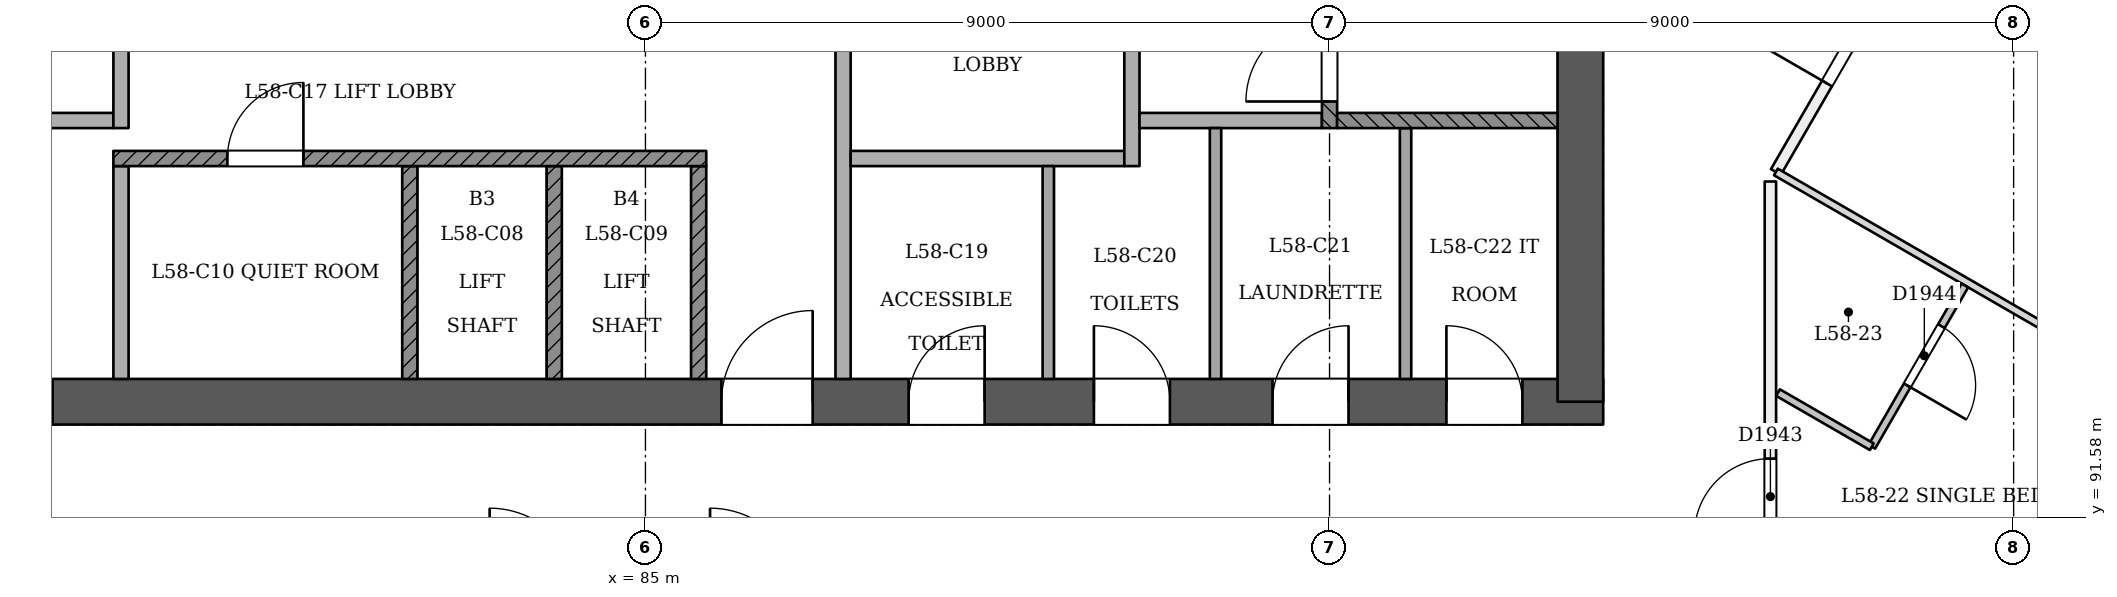
"""IFC4 building model, lengths in metres.
Left out: names, types, materials, properties, quantities, classifications, styles, units other than length and angle.
Written with IfcOpenShell. Run it as: python <this file> out.ifc"""

import sys

from ifc_helpers import new_model, si_unit, direction, frame, frame_2d, origin, place, context, subcontext, project, spatial, rectangle, extrude, element, fill, save


model = new_model("IFC4")
c1 = context("Model", 3, precision=1e-05, world=origin(), true_north=direction((0.0, 1.0)))
c2 = subcontext(c1, "Body", "Model", "MODEL_VIEW")
j1 = project(units=[si_unit("LENGTHUNIT", "METRE"), si_unit("PLANEANGLEUNIT", "RADIAN")], contexts=[c1])
p1 = place(None, origin())
s1 = spatial("IfcSite", under=j1, at=p1, CompositionType="ELEMENT")
p2 = place(p1, origin())
s2 = spatial("IfcBuilding", under=s1, at=p2, CompositionType="ELEMENT")
p3 = place(p2, frame((0.0, 0.0, 226.6)))
s3 = spatial("IfcBuildingStorey", under=s2, at=p3, CompositionType="ELEMENT", Elevation=226.6)
p4 = place(p3, frame((72.7, 93.1, 0.0), z_axis=(0.0, 0.0, 1.0), x_axis=(1.0, 0.0, 0.0)))
e1 = element("IfcWall", 1, at=p4, inside=s3, PredefinedType="SHEAR", context=c2, shape_type="SweptSolid", body=[
    extrude(rectangle(XDim=24.9, YDim=0.6, at=frame_2d((12.45, 0.0))), origin(), (0.0, 0.0, 1.0), 3.6),
])
p5 = place(p4, frame((1.1, 0.0, 0.0)))
e2 = element("IfcOpeningElement", 2, at=p5, cuts=e1, PredefinedType="OPENING", context=c2, shape_type="SweptSolid", body=[
    extrude(rectangle(XDim=1.2, YDim=2.1, at=frame_2d((0.6, 1.05))), frame((0.0, 0.311, 0.0), z_axis=(0.0, -1.0, 0.0), x_axis=(1.0, 0.0, 0.0)), (0.0, 0.0, 1.0), 0.621),
])
p6 = place(p4, frame((3.3, 0.0, 0.0)))
e3 = element("IfcOpeningElement", 3, at=p6, cuts=e1, PredefinedType="OPENING", context=c2, shape_type="SweptSolid", body=[
    extrude(rectangle(XDim=1.2, YDim=2.1, at=frame_2d((0.6, 1.05))), frame((0.0, 0.311, 0.0), z_axis=(0.0, -1.0, 0.0), x_axis=(1.0, 0.0, 0.0)), (0.0, 0.0, 1.0), 0.621),
])
p7 = place(p4, frame((13.3, 0.0, 0.0)))
e4 = element("IfcOpeningElement", 4, at=p7, cuts=e1, PredefinedType="OPENING", context=c2, shape_type="SweptSolid", body=[
    extrude(rectangle(XDim=1.2, YDim=2.1, at=frame_2d((0.6, 1.05))), frame((0.0, 0.311, 0.0), z_axis=(0.0, -1.0, 0.0), x_axis=(1.0, 0.0, 0.0)), (0.0, 0.0, 1.0), 0.621),
])
p8 = place(p4, frame((15.762, 0.0, 0.0)))
e5 = element("IfcOpeningElement", 5, at=p8, cuts=e1, PredefinedType="OPENING", context=c2, shape_type="SweptSolid", body=[
    extrude(rectangle(XDim=1.0, YDim=2.1, at=frame_2d((0.5, 1.05))), frame((0.0, 0.311, 0.0), z_axis=(0.0, -1.0, 0.0), x_axis=(1.0, 0.0, 0.0)), (0.0, 0.0, 1.0), 0.621),
])
p9 = place(p4, frame((18.2, 0.0, 0.0)))
e6 = element("IfcOpeningElement", 6, at=p9, cuts=e1, PredefinedType="OPENING", context=c2, shape_type="SweptSolid", body=[
    extrude(rectangle(XDim=1.0, YDim=2.1, at=frame_2d((0.5, 1.05))), frame((0.0, 0.311, 0.0), z_axis=(0.0, -1.0, 0.0), x_axis=(1.0, 0.0, 0.0)), (0.0, 0.0, 1.0), 0.621),
])
p10 = place(p4, frame((20.55, 0.0, 0.0)))
e7 = element("IfcOpeningElement", 7, at=p10, cuts=e1, PredefinedType="OPENING", context=c2, shape_type="SweptSolid", body=[
    extrude(rectangle(XDim=1.0, YDim=2.1, at=frame_2d((0.5, 1.05))), frame((0.0, 0.311, 0.0), z_axis=(0.0, -1.0, 0.0), x_axis=(1.0, 0.0, 0.0)), (0.0, 0.0, 1.0), 0.621),
])
p11 = place(p4, frame((22.837, 0.0, 0.0)))
e8 = element("IfcOpeningElement", 8, at=p11, cuts=e1, PredefinedType="OPENING", context=c2, shape_type="SweptSolid", body=[
    extrude(rectangle(XDim=1.0, YDim=2.1, at=frame_2d((0.5, 1.05))), frame((0.0, 0.311, 0.0), z_axis=(0.0, -1.0, 0.0), x_axis=(1.0, 0.0, 0.0)), (0.0, 0.0, 1.0), 0.621),
])
p12 = place(p3, frame((97.3, 93.1, 0.0), z_axis=(0.0, 0.0, 1.0), x_axis=(0.0, 1.0, 0.0)))
e9 = element("IfcWall", 9, at=p12, inside=s3, PredefinedType="SHEAR", context=c2, shape_type="SweptSolid", body=[
    extrude(rectangle(XDim=10.9, YDim=0.6, at=frame_2d((5.45, 0.0))), origin(), (0.0, 0.0, 1.0), 3.6),
])
p13 = place(p3, frame((99.8, 90.2, 0.0), z_axis=(0.0, 0.0, 1.0), x_axis=(0.0, 1.0, 0.0)))
e10 = element("IfcWall", 10, at=p13, inside=s3, PredefinedType="PARTITIONING", context=c2, shape_type="SweptSolid", body=[
    extrude(rectangle(XDim=5.798, YDim=0.15, at=frame_2d((2.899, 0.0))), origin(), (0.0, 0.0, 1.0), 3.2),
])
p14 = place(p13, frame((1.152, 0.0, 0.0)))
e11 = element("IfcOpeningElement", 11, at=p14, cuts=e10, PredefinedType="OPENING", context=c2, shape_type="SweptSolid", body=[
    extrude(rectangle(XDim=1.0, YDim=2.1, at=frame_2d((0.5, 1.05))), frame((0.0, 0.085, 0.0), z_axis=(0.0, -1.0, 0.0), x_axis=(1.0, 0.0, 0.0)), (0.0, 0.0, 1.0), 0.171),
])
p15 = place(p3, frame((99.872, 96.123, 0.0), z_axis=(0.0, 0.0, 1.0), x_axis=(0.500061224174, 0.865990053105, 0.0)))
e12 = element("IfcWall", 12, at=p15, inside=s3, PredefinedType="PARTITIONING", context=c2, shape_type="SweptSolid", body=[
    extrude(rectangle(XDim=2.745, YDim=0.15, at=frame_2d((1.373, 0.0))), origin(), (0.0, 0.0, 1.0), 3.2),
])
p16 = place(p15, frame((1.345, 0.0, 0.0)))
e13 = element("IfcOpeningElement", 13, at=p16, cuts=e12, PredefinedType="OPENING", context=c2, shape_type="SweptSolid", body=[
    extrude(rectangle(XDim=1.2, YDim=2.1, at=frame_2d((0.6, 1.05))), frame((0.0, 0.085, 0.0), z_axis=(0.0, -1.0, 0.0), x_axis=(1.0, 0.0, 0.0)), (0.0, 0.0, 1.0), 0.171),
])
p17 = place(p3, frame((102.359, 94.63, 0.0), z_axis=(0.0, 0.0, 1.0), x_axis=(-0.500018594424, -0.866014668023, 0.0)))
e14 = element("IfcWall", 14, at=p17, inside=s3, PredefinedType="PARTITIONING", context=c2, shape_type="SweptSolid", body=[
    extrude(rectangle(XDim=2.45, YDim=0.1, at=frame_2d((1.225, 0.0))), origin(), (0.0, 0.0, 1.0), 3.2),
])
p18 = place(p17, frame((0.618, 0.0, 0.0)))
e15 = element("IfcOpeningElement", 15, at=p18, cuts=e14, PredefinedType="OPENING", context=c2, shape_type="SweptSolid", body=[
    extrude(rectangle(XDim=0.9, YDim=2.1, at=frame_2d((0.45, 1.05))), frame((0.0, 0.061, 0.0), z_axis=(0.0, -1.0, 0.0), x_axis=(1.0, 0.0, 0.0)), (0.0, 0.0, 1.0), 0.121),
])
p19 = place(p3, frame((101.134, 92.508, 0.0), z_axis=(0.0, 0.0, 1.0), x_axis=(-0.866020080793, 0.500009219579, 0.0)))
e16 = element("IfcWall", 16, at=p19, inside=s3, PredefinedType="PARTITIONING", context=c2, shape_type="SweptSolid", body=[
    extrude(rectangle(XDim=1.425, YDim=0.1, at=frame_2d((0.712, 0.0))), origin(), (0.0, 0.0, 1.0), 3.2),
])
p20 = place(p3, frame((105.415, 92.923, 0.0), z_axis=(0.0, 0.0, 1.0), x_axis=(-0.866018518567, 0.500011925357, 0.0)))
e17 = element("IfcWall", 17, at=p20, inside=s3, PredefinedType="PARTITIONING", context=c2, shape_type="SweptSolid", body=[
    extrude(rectangle(XDim=6.4, YDim=0.1, at=frame_2d((3.2, 0.0))), origin(), (0.0, 0.0, 1.0), 2.7),
])
p21 = place(p3, frame((78.1, 93.4, 0.0), z_axis=(0.0, 0.0, 1.0), x_axis=(0.0, 1.0, 0.0)))
e18 = element("IfcWall", 18, at=p21, inside=s3, PredefinedType="PARTITIONING", context=c2, shape_type="SweptSolid", body=[
    extrude(rectangle(XDim=2.8, YDim=0.2, at=frame_2d((1.4, 0.0))), origin(), (0.0, 0.0, 1.0), 3.2),
])
for number, where, z_axis, x_axis in (
    (19, (81.9, 93.4, 0.0), (0.0, 0.0, 1.0), (0.0, 1.0, 0.0)),
    (20, (83.8, 93.4, 0.0), (0.0, 0.0, 1.0), (0.0, 1.0, 0.0)),
    (21, (85.7, 93.4, 0.0), (0.0, 0.0, 1.0), (0.0, 1.0, 0.0)),
):
    element("IfcWall", number, at=place(p3, frame(where, z_axis=z_axis, x_axis=x_axis)), inside=s3, PredefinedType="SOLIDWALL", context=c2, shape_type="SweptSolid", body=[
        extrude(rectangle(XDim=2.8, YDim=0.2, at=frame_2d((1.4, 0.0))), origin(), (0.0, 0.0, 1.0), 3.2),
    ])
p22 = place(p3, frame((87.6, 93.4, 0.0), z_axis=(0.0, 0.0, 1.0), x_axis=(0.0, 1.0, 0.0)))
e22 = element("IfcWall", 22, at=p22, inside=s3, PredefinedType="PARTITIONING", context=c2, shape_type="SweptSolid", body=[
    extrude(rectangle(XDim=7.0, YDim=0.2, at=frame_2d((3.5, 0.0))), origin(), (0.0, 0.0, 1.0), 3.2),
])
p23 = place(p22, frame((4.45, 0.0, 0.0)))
e23 = element("IfcOpeningElement", 23, at=p23, cuts=e22, PredefinedType="OPENING", context=c2, shape_type="SweptSolid", body=[
    extrude(rectangle(XDim=1.1, YDim=2.1, at=frame_2d((0.55, 1.05))), frame((0.0, 0.11, 0.0), z_axis=(0.0, -1.0, 0.0), x_axis=(1.0, 0.0, 0.0)), (0.0, 0.0, 1.0), 0.221),
])
p24 = place(p3, frame((90.3, 93.4, 0.0), z_axis=(0.0, 0.0, 1.0), x_axis=(0.0, 1.0, 0.0)))
e24 = element("IfcWall", 24, at=p24, inside=s3, PredefinedType="PARTITIONING", context=c2, shape_type="SweptSolid", body=[
    extrude(rectangle(XDim=2.8, YDim=0.15, at=frame_2d((1.4, 0.0))), origin(), (0.0, 0.0, 1.0), 3.2),
])
for number, where, z_axis, x_axis in (
    (25, (92.5, 93.4, 0.0), (0.0, 0.0, 1.0), (0.0, 1.0, 0.0)),
    (26, (95.0, 93.4, 0.0), (0.0, 0.0, 1.0), (0.0, 1.0, 0.0)),
):
    element("IfcWall", number, at=place(p3, frame(where, z_axis=z_axis, x_axis=x_axis)), inside=s3, PredefinedType="PARTITIONING", context=c2, shape_type="SweptSolid", body=[
        extrude(rectangle(XDim=3.3, YDim=0.15, at=frame_2d((1.65, 0.0))), origin(), (0.0, 0.0, 1.0), 3.2),
    ])
p25 = place(p3, frame((78.0, 96.3, 0.0), z_axis=(0.0, 0.0, 1.0), x_axis=(1.0, 0.0, 0.0)))
e27 = element("IfcWall", 27, at=p25, inside=s3, PredefinedType="SOLIDWALL", context=c2, shape_type="SweptSolid", body=[
    extrude(rectangle(XDim=7.8, YDim=0.2, at=frame_2d((3.9, 0.0))), origin(), (0.0, 0.0, 1.0), 3.2),
])
p26 = place(p25, frame((1.5, 0.0, 0.0)))
e28 = element("IfcOpeningElement", 28, at=p26, cuts=e27, PredefinedType="OPENING", context=c2, shape_type="SweptSolid", body=[
    extrude(rectangle(XDim=1.0, YDim=2.1, at=frame_2d((0.5, 1.05))), frame((0.0, 0.11, 0.0), z_axis=(0.0, -1.0, 0.0), x_axis=(1.0, 0.0, 0.0)), (0.0, 0.0, 1.0), 0.221),
])
p27 = place(p3, frame((87.7, 96.3, 0.0), z_axis=(0.0, 0.0, 1.0), x_axis=(1.0, 0.0, 0.0)))
e29 = element("IfcWall", 29, at=p27, inside=s3, PredefinedType="PARTITIONING", context=c2, shape_type="SweptSolid", body=[
    extrude(rectangle(XDim=3.6, YDim=0.2, at=frame_2d((1.8, 0.0))), origin(), (0.0, 0.0, 1.0), 3.2),
])
p28 = place(p3, frame((91.4, 96.2, 0.0), z_axis=(0.0, 0.0, 1.0), x_axis=(0.0, 1.0, 0.0)))
e30 = element("IfcWall", 30, at=p28, inside=s3, PredefinedType="PARTITIONING", context=c2, shape_type="SweptSolid", body=[
    extrude(rectangle(XDim=4.2, YDim=0.2, at=frame_2d((2.1, 0.0))), origin(), (0.0, 0.0, 1.0), 3.2),
])
p29 = place(p28, frame((2.45, 0.0, 0.0)))
e31 = element("IfcOpeningElement", 31, at=p29, cuts=e30, PredefinedType="OPENING", context=c2, shape_type="SweptSolid", body=[
    extrude(rectangle(XDim=1.1, YDim=2.1, at=frame_2d((0.55, 1.05))), frame((0.0, 0.11, 0.0), z_axis=(0.0, -1.0, 0.0), x_axis=(1.0, 0.0, 0.0)), (0.0, 0.0, 1.0), 0.221),
])
p30 = place(p3, frame((76.1, 96.8, 0.0), z_axis=(0.0, 0.0, 1.0), x_axis=(1.0, 0.0, 0.0)))
e32 = element("IfcWall", 32, at=p30, inside=s3, PredefinedType="PARTITIONING", context=c2, shape_type="SweptSolid", body=[
    extrude(rectangle(XDim=1.9, YDim=0.2, at=frame_2d((0.95, 0.0))), origin(), (0.0, 0.0, 1.0), 3.2),
])
p31 = place(p3, frame((78.1, 96.7, 0.0), z_axis=(0.0, 0.0, 1.0), x_axis=(0.0, 1.0, 0.0)))
e33 = element("IfcWall", 33, at=p31, inside=s3, PredefinedType="PARTITIONING", context=c2, shape_type="SweptSolid", body=[
    extrude(rectangle(XDim=3.7, YDim=0.2, at=frame_2d((1.85, 0.0))), origin(), (0.0, 0.0, 1.0), 3.2),
])
p32 = place(p31, frame((1.95, 0.0, 0.0)))
e34 = element("IfcOpeningElement", 34, at=p32, cuts=e33, PredefinedType="OPENING", context=c2, shape_type="SweptSolid", body=[
    extrude(rectangle(XDim=1.1, YDim=2.1, at=frame_2d((0.55, 1.05))), frame((0.0, 0.11, 0.0), z_axis=(0.0, -1.0, 0.0), x_axis=(1.0, 0.0, 0.0)), (0.0, 0.0, 1.0), 0.221),
])
p33 = place(p3, frame((91.5, 96.8, 0.0), z_axis=(0.0, 0.0, 1.0), x_axis=(1.0, 0.0, 0.0)))
e35 = element("IfcWall", 35, at=p33, inside=s3, PredefinedType="PARTITIONING", context=c2, shape_type="SweptSolid", body=[
    extrude(rectangle(XDim=2.4, YDim=0.2, at=frame_2d((1.2, 0.0))), origin(), (0.0, 0.0, 1.0), 3.2),
])
p34 = place(p3, frame((94.0, 96.7, 0.0), z_axis=(0.0, 0.0, 1.0), x_axis=(0.0, 1.0, 0.0)))
e36 = element("IfcWall", 36, at=p34, inside=s3, PredefinedType="SOLIDWALL", context=c2, shape_type="SweptSolid", body=[
    extrude(rectangle(XDim=3.7, YDim=0.2, at=frame_2d((1.85, 0.0))), origin(), (0.0, 0.0, 1.0), 3.2),
])
p35 = place(p34, frame((0.35, 0.0, 0.0)))
e37 = element("IfcOpeningElement", 37, at=p35, cuts=e36, PredefinedType="OPENING", context=c2, shape_type="SweptSolid", body=[
    extrude(rectangle(XDim=1.1, YDim=2.1, at=frame_2d((0.55, 1.05))), frame((0.0, 0.11, 0.0), z_axis=(0.0, -1.0, 0.0), x_axis=(1.0, 0.0, 0.0)), (0.0, 0.0, 1.0), 0.221),
])
p36 = place(p3, frame((94.1, 96.8, 0.0), z_axis=(0.0, 0.0, 1.0), x_axis=(1.0, 0.0, 0.0)))
e38 = element("IfcWall", 38, at=p36, inside=s3, PredefinedType="SOLIDWALL", context=c2, shape_type="SweptSolid", body=[
    extrude(rectangle(XDim=2.9, YDim=0.2, at=frame_2d((1.45, 0.0))), origin(), (0.0, 0.0, 1.0), 3.2),
])
p37 = place(p14, origin())
e39 = element("IfcDoor", 39, at=p37, inside=s3, OperationType="SINGLE_SWING_LEFT", PredefinedType="NOTDEFINED", context=c2, shape_type="SweptSolid", body=[
    extrude(rectangle(XDim=1.0, YDim=2.1, at=frame_2d((0.5, 1.05))), frame((0.0, 0.025, 0.0), z_axis=(0.0, -1.0, 0.0), x_axis=(1.0, 0.0, 0.0)), (0.0, 0.0, 1.0), 0.05),
])
fill(e11, e39)
p38 = place(p18, origin())
e40 = element("IfcDoor", 40, at=p38, inside=s3, OperationType="SINGLE_SWING_RIGHT", PredefinedType="NOTDEFINED", context=c2, shape_type="SweptSolid", body=[
    extrude(rectangle(XDim=0.9, YDim=2.1, at=frame_2d((0.45, 1.05))), frame((0.0, 0.025, 0.0), z_axis=(0.0, -1.0, 0.0), x_axis=(1.0, 0.0, 0.0)), (0.0, 0.0, 1.0), 0.05),
])
fill(e15, e40)
p39 = place(p16, origin())
e41 = element("IfcDoor", 41, at=p39, inside=s3, OperationType="SINGLE_SWING_LEFT", PredefinedType="NOTDEFINED", context=c2, shape_type="SweptSolid", body=[
    extrude(rectangle(XDim=1.2, YDim=2.1, at=frame_2d((0.6, 1.05))), frame((0.0, 0.025, 0.0), z_axis=(0.0, -1.0, 0.0), x_axis=(1.0, 0.0, 0.0)), (0.0, 0.0, 1.0), 0.05),
])
fill(e13, e41)
p40 = place(p35, origin())
e42 = element("IfcDoor", 42, at=p40, inside=s3, OperationType="SINGLE_SWING_LEFT", PredefinedType="NOTDEFINED", context=c2, shape_type="SweptSolid", body=[
    extrude(rectangle(XDim=1.1, YDim=2.1, at=frame_2d((0.55, 1.05))), frame((0.0, 0.025, 0.0), z_axis=(0.0, -1.0, 0.0), x_axis=(1.0, 0.0, 0.0)), (0.0, 0.0, 1.0), 0.05),
])
fill(e37, e42)
p41 = place(p6, origin())
e43 = element("IfcDoor", 43, at=p41, inside=s3, OperationType="SINGLE_SWING_LEFT", PredefinedType="NOTDEFINED", context=c2, shape_type="SweptSolid", body=[
    extrude(rectangle(XDim=1.2, YDim=2.1, at=frame_2d((0.6, 1.05))), frame((0.0, 0.025, 0.0), z_axis=(0.0, -1.0, 0.0), x_axis=(1.0, 0.0, 0.0)), (0.0, 0.0, 1.0), 0.05),
])
fill(e3, e43)
p42 = place(p7, origin())
e44 = element("IfcDoor", 44, at=p42, inside=s3, OperationType="SINGLE_SWING_RIGHT", PredefinedType="NOTDEFINED", context=c2, shape_type="SweptSolid", body=[
    extrude(rectangle(XDim=1.2, YDim=2.1, at=frame_2d((0.6, 1.05))), frame((0.0, 0.025, 0.0), z_axis=(0.0, -1.0, 0.0), x_axis=(1.0, 0.0, 0.0)), (0.0, 0.0, 1.0), 0.05),
])
fill(e4, e44)
p43 = place(p8, origin())
e45 = element("IfcDoor", 45, at=p43, inside=s3, OperationType="SINGLE_SWING_RIGHT", PredefinedType="NOTDEFINED", context=c2, shape_type="SweptSolid", body=[
    extrude(rectangle(XDim=1.0, YDim=2.1, at=frame_2d((0.5, 1.05))), frame((0.0, 0.025, 0.0), z_axis=(0.0, -1.0, 0.0), x_axis=(1.0, 0.0, 0.0)), (0.0, 0.0, 1.0), 0.05),
])
fill(e5, e45)
p44 = place(p9, origin())
e46 = element("IfcDoor", 46, at=p44, inside=s3, OperationType="SINGLE_SWING_LEFT", PredefinedType="NOTDEFINED", context=c2, shape_type="SweptSolid", body=[
    extrude(rectangle(XDim=1.0, YDim=2.1, at=frame_2d((0.5, 1.05))), frame((0.0, 0.025, 0.0), z_axis=(0.0, -1.0, 0.0), x_axis=(1.0, 0.0, 0.0)), (0.0, 0.0, 1.0), 0.05),
])
fill(e6, e46)
p45 = place(p10, origin())
e47 = element("IfcDoor", 47, at=p45, inside=s3, OperationType="SINGLE_SWING_RIGHT", PredefinedType="NOTDEFINED", context=c2, shape_type="SweptSolid", body=[
    extrude(rectangle(XDim=1.0, YDim=2.1, at=frame_2d((0.5, 1.05))), frame((0.0, 0.025, 0.0), z_axis=(0.0, -1.0, 0.0), x_axis=(1.0, 0.0, 0.0)), (0.0, 0.0, 1.0), 0.05),
])
fill(e7, e47)
p46 = place(p11, origin())
e48 = element("IfcDoor", 48, at=p46, inside=s3, OperationType="SINGLE_SWING_LEFT", PredefinedType="NOTDEFINED", context=c2, shape_type="SweptSolid", body=[
    extrude(rectangle(XDim=1.0, YDim=2.1, at=frame_2d((0.5, 1.05))), frame((0.0, 0.025, 0.0), z_axis=(0.0, -1.0, 0.0), x_axis=(1.0, 0.0, 0.0)), (0.0, 0.0, 1.0), 0.05),
])
fill(e8, e48)
p47 = place(p26, origin())
e49 = element("IfcDoor", 49, at=p47, inside=s3, OperationType="SINGLE_SWING_RIGHT", PredefinedType="NOTDEFINED", context=c2, shape_type="SweptSolid", body=[
    extrude(rectangle(XDim=1.0, YDim=2.1, at=frame_2d((0.5, 1.05))), frame((0.0, 0.025, 0.0), z_axis=(0.0, -1.0, 0.0), x_axis=(1.0, 0.0, 0.0)), (0.0, 0.0, 1.0), 0.05),
])
fill(e28, e49)
save(model, sys.argv[1])
